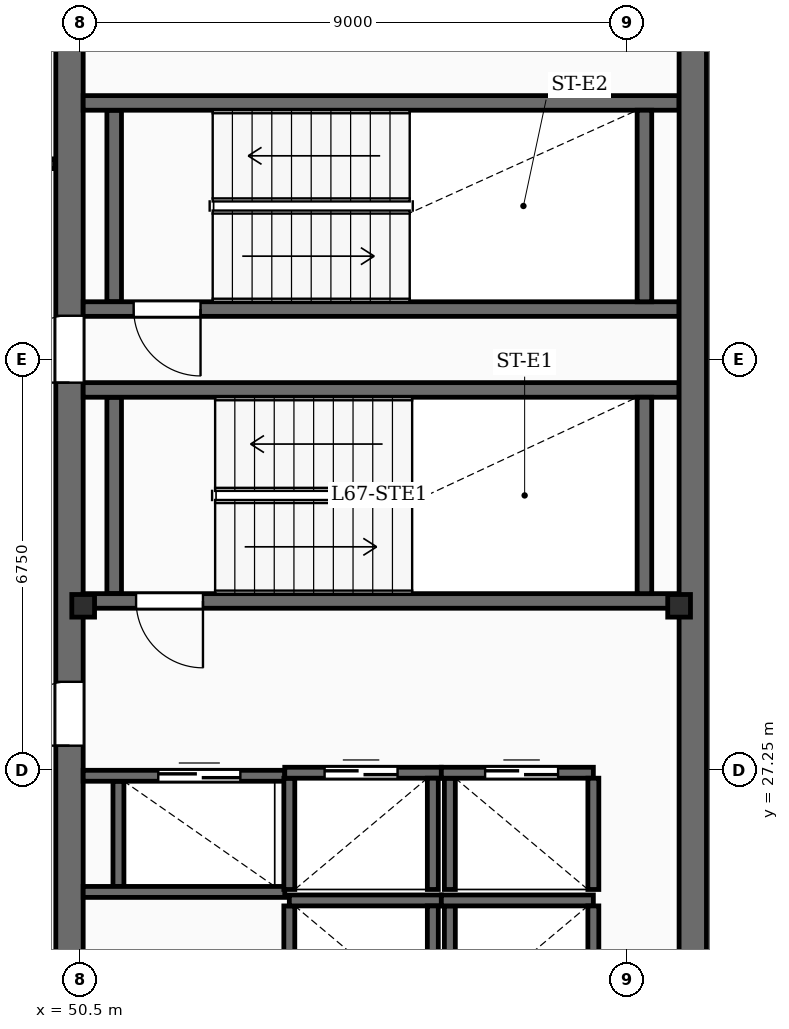
"""IFC4 building model, lengths in metres.
Left out: names, types, materials, properties, quantities, classifications, styles, units other than length and angle.
Written with IfcOpenShell. Run it as: python <this file> out.ifc"""

import sys

from ifc_helpers import new_model, si_unit, direction, frame, frame_2d, origin, origin_2d, place, context, subcontext, project, spatial, rectangle, i_section, extrude, element, fill, save


model = new_model("IFC4")
c1 = context("Model", 3, precision=1e-05, world=origin(), true_north=direction((0.0, 1.0)))
c2 = subcontext(c1, "Body", "Model", "MODEL_VIEW")
j1 = project(units=[si_unit("LENGTHUNIT", "METRE"), si_unit("PLANEANGLEUNIT", "RADIAN")], contexts=[c1])
p1 = place(None, origin())
s1 = spatial("IfcSite", under=j1, at=p1, CompositionType="ELEMENT")
p2 = place(p1, origin())
s2 = spatial("IfcBuilding", under=s1, at=p2, CompositionType="ELEMENT")
p3 = place(p2, frame((0.0, 0.0, 274.9)))
s3 = spatial("IfcBuildingStorey", under=s2, at=p3, CompositionType="ELEMENT", Elevation=274.9)
p4 = place(p3, frame((50.325, 19.0, -0.45), z_axis=(0.0, 0.0, 1.0), x_axis=(0.0, 1.0, 0.0)))
e1 = element("IfcWall", 1, at=p4, inside=s3, PredefinedType="SHEAR", context=c2, shape_type="SweptSolid", body=[
    extrude(rectangle(XDim=20.8, YDim=0.45, at=frame_2d((10.4, 0.0))), origin(), (0.0, 0.0, 1.0), 3.93),
])
p5 = place(p4, frame((2.5, 0.0, 0.45)))
e2 = element("IfcOpeningElement", 2, at=p5, cuts=e1, PredefinedType="OPENING", context=c2, shape_type="SweptSolid", body=[
    extrude(rectangle(XDim=1.05, YDim=2.15, at=frame_2d((0.525, 1.075))), frame((0.0, 0.235, 0.0), z_axis=(0.0, -1.0, 0.0), x_axis=(1.0, 0.0, 0.0)), (0.0, 0.0, 1.0), 0.47),
])
p6 = place(p4, frame((8.65, 0.0, 0.45)))
e3 = element("IfcOpeningElement", 3, at=p6, cuts=e1, PredefinedType="OPENING", context=c2, shape_type="SweptSolid", body=[
    extrude(rectangle(XDim=1.05, YDim=2.15, at=frame_2d((0.525, 1.075))), frame((0.0, 0.235, 0.0), z_axis=(0.0, -1.0, 0.0), x_axis=(1.0, 0.0, 0.0)), (0.0, 0.0, 1.0), 0.47),
])
p7 = place(p4, frame((14.62, 0.0, 0.45)))
e4 = element("IfcOpeningElement", 4, at=p7, cuts=e1, PredefinedType="OPENING", context=c2, shape_type="SweptSolid", body=[
    extrude(rectangle(XDim=1.1, YDim=2.15, at=frame_2d((0.55, 1.075))), frame((0.0, 0.235, 0.0), z_axis=(0.0, -1.0, 0.0), x_axis=(1.0, 0.0, 0.0)), (0.0, 0.0, 1.0), 0.47),
])
p8 = place(p3, frame((60.575, 19.0, -0.45), z_axis=(0.0, 0.0, 1.0), x_axis=(0.0, 1.0, 0.0)))
e5 = element("IfcWall", 5, at=p8, inside=s3, PredefinedType="SHEAR", context=c2, shape_type="SweptSolid", body=[
    extrude(rectangle(XDim=20.8, YDim=0.45, at=frame_2d((10.4, 0.0))), origin(), (0.0, 0.0, 1.0), 3.93),
])
for number, where, z_axis, x_axis in (
    (6, (50.55, 29.95, -0.45), (0.0, 0.0, 1.0), (1.0, 0.0, 0.0)),
    (7, (60.35, 29.95, -0.45), (0.0, 0.0, 1.0), (1.0, 0.0, 0.0)),
):
    element("IfcColumn", number, at=place(p3, frame(where, z_axis=z_axis, x_axis=x_axis)), inside=s3, PredefinedType="COLUMN", context=c2, shape_type="SweptSolid", body=[
        extrude(i_section(OverallWidth=0.374, OverallDepth=0.372, WebThickness=0.016, FlangeThickness=0.026, FilletRadius=0.02, at=origin_2d()), origin(), (0.0, 0.0, 1.0), 3.93),
    ])
p9 = place(p3, frame((60.35, 30.03, 0.0), z_axis=(0.0, 0.0, 1.0), x_axis=(-1.0, 0.0, 0.0)))
e8 = element("IfcWall", 8, at=p9, inside=s3, PredefinedType="SOLIDWALL", context=c2, shape_type="SweptSolid", body=[
    extrude(rectangle(XDim=9.8, YDim=0.24, at=frame_2d((4.9, 0.0))), origin(), (0.0, 0.0, 1.0), 3.48),
])
p10 = place(p9, frame((7.83, 0.0, 0.0)))
e9 = element("IfcOpeningElement", 9, at=p10, cuts=e8, PredefinedType="OPENING", context=c2, shape_type="SweptSolid", body=[
    extrude(rectangle(XDim=1.1, YDim=2.15, at=frame_2d((0.55, 1.075))), frame((0.0, 0.13, 0.0), z_axis=(0.0, -1.0, 0.0), x_axis=(1.0, 0.0, 0.0)), (0.0, 0.0, 1.0), 0.26),
])
p11 = place(p3, frame((50.55, 33.5, 0.0), z_axis=(0.0, 0.0, 1.0), x_axis=(1.0, 0.0, 0.0)))
e10 = element("IfcWall", 10, at=p11, inside=s3, PredefinedType="SOLIDWALL", context=c2, shape_type="SweptSolid", body=[
    extrude(rectangle(XDim=9.8, YDim=0.24, at=frame_2d((4.9, 0.0))), origin(), (0.0, 0.0, 1.0), 3.48),
])
for number, where, z_axis, x_axis in (
    (11, (51.06, 30.15, 0.0), (0.0, 0.0, 1.0), (0.0, 1.0, 0.0)),
    (12, (59.78, 30.15, 0.0), (0.0, 0.0, 1.0), (0.0, 1.0, 0.0)),
):
    element("IfcWall", number, at=place(p3, frame(where, z_axis=z_axis, x_axis=x_axis)), inside=s3, PredefinedType="SOLIDWALL", context=c2, shape_type="SweptSolid", body=[
        extrude(rectangle(XDim=3.23, YDim=0.24, at=frame_2d((1.615, 0.0))), origin(), (0.0, 0.0, 1.0), 3.48),
    ])
p12 = place(p3, frame((60.35, 34.83, 0.0), z_axis=(0.0, 0.0, 1.0), x_axis=(-1.0, 0.0, 0.0)))
e13 = element("IfcWall", 13, at=p12, inside=s3, PredefinedType="SOLIDWALL", context=c2, shape_type="SweptSolid", body=[
    extrude(rectangle(XDim=9.8, YDim=0.24, at=frame_2d((4.9, 0.0))), origin(), (0.0, 0.0, 1.0), 3.48),
])
p13 = place(p12, frame((7.87, 0.0, 0.0)))
e14 = element("IfcOpeningElement", 14, at=p13, cuts=e13, PredefinedType="OPENING", context=c2, shape_type="SweptSolid", body=[
    extrude(rectangle(XDim=1.1, YDim=2.15, at=frame_2d((0.55, 1.075))), frame((0.0, 0.13, 0.0), z_axis=(0.0, -1.0, 0.0), x_axis=(1.0, 0.0, 0.0)), (0.0, 0.0, 1.0), 0.26),
])
p14 = place(p3, frame((50.55, 38.22, 0.0), z_axis=(0.0, 0.0, 1.0), x_axis=(1.0, 0.0, 0.0)))
e15 = element("IfcWall", 15, at=p14, inside=s3, PredefinedType="SOLIDWALL", context=c2, shape_type="SweptSolid", body=[
    extrude(rectangle(XDim=9.8, YDim=0.24, at=frame_2d((4.9, 0.0))), origin(), (0.0, 0.0, 1.0), 3.48),
])
for number, where, z_axis, x_axis in (
    (16, (51.06, 34.95, 0.0), (0.0, 0.0, 1.0), (0.0, 1.0, 0.0)),
    (17, (59.78, 34.95, 0.0), (0.0, 0.0, 1.0), (0.0, 1.0, 0.0)),
):
    element("IfcWall", number, at=place(p3, frame(where, z_axis=z_axis, x_axis=x_axis)), inside=s3, PredefinedType="SOLIDWALL", context=c2, shape_type="SweptSolid", body=[
        extrude(rectangle(XDim=3.15, YDim=0.24, at=frame_2d((1.575, 0.0))), origin(), (0.0, 0.0, 1.0), 3.48),
    ])
p15 = place(p3, frame((53.94, 25.105, 0.0), z_axis=(0.0, 0.0, 1.0), x_axis=(1.0, 0.0, 0.0)))
e18 = element("IfcWall", 18, at=p15, inside=s3, PredefinedType="SOLIDWALL", context=c2, shape_type="SweptSolid", body=[
    extrude(rectangle(XDim=2.5, YDim=0.18, at=frame_2d((1.25, 0.0))), origin(), (0.0, 0.0, 1.0), 3.48),
])
for number, where, z_axis, x_axis in (
    (19, (53.94, 23.185, 0.0), (0.0, 0.0, 1.0), (0.0, 1.0, 0.0)),
    (20, (56.3, 23.185, 0.0), (0.0, 0.0, 1.0), (0.0, 1.0, 0.0)),
):
    element("IfcWall", number, at=place(p3, frame(where, z_axis=z_axis, x_axis=x_axis)), inside=s3, PredefinedType="SOLIDWALL", context=c2, shape_type="SweptSolid", body=[
        extrude(rectangle(XDim=1.83, YDim=0.18, at=frame_2d((0.915, 0.0))), origin(), (0.0, 0.0, 1.0), 3.48),
    ])
p16 = place(p3, frame((56.44, 25.105, 0.0), z_axis=(0.0, 0.0, 1.0), x_axis=(1.0, 0.0, 0.0)))
e21 = element("IfcWall", 21, at=p16, inside=s3, PredefinedType="SOLIDWALL", context=c2, shape_type="SweptSolid", body=[
    extrude(rectangle(XDim=2.5, YDim=0.18, at=frame_2d((1.25, 0.0))), origin(), (0.0, 0.0, 1.0), 3.48),
])
for number, where, z_axis, x_axis in (
    (22, (56.58, 23.185, 0.0), (0.0, 0.0, 1.0), (0.0, 1.0, 0.0)),
    (23, (58.94, 23.185, 0.0), (0.0, 0.0, 1.0), (0.0, 1.0, 0.0)),
):
    element("IfcWall", number, at=place(p3, frame(where, z_axis=z_axis, x_axis=x_axis)), inside=s3, PredefinedType="SOLIDWALL", context=c2, shape_type="SweptSolid", body=[
        extrude(rectangle(XDim=1.83, YDim=0.18, at=frame_2d((0.915, 0.0))), origin(), (0.0, 0.0, 1.0), 3.48),
    ])
p17 = place(p3, frame((53.865, 27.205, 0.0), z_axis=(0.0, 0.0, 1.0), x_axis=(1.0, 0.0, 0.0)))
e24 = element("IfcWall", 24, at=p17, inside=s3, PredefinedType="SOLIDWALL", context=c2, shape_type="SweptSolid", body=[
    extrude(rectangle(XDim=2.575, YDim=0.18, at=frame_2d((1.288, 0.0))), origin(), (0.0, 0.0, 1.0), 3.48),
])
p18 = place(p17, frame((0.655, 0.0, 0.0)))
e25 = element("IfcOpeningElement", 25, at=p18, cuts=e24, PredefinedType="OPENING", context=c2, shape_type="SweptSolid", body=[
    extrude(rectangle(XDim=1.2, YDim=2.2, at=frame_2d((0.6, 1.1))), frame((0.0, 0.1, 0.0), z_axis=(0.0, -1.0, 0.0), x_axis=(1.0, 0.0, 0.0)), (0.0, 0.0, 1.0), 0.2),
])
for number, where, z_axis, x_axis in (
    (26, (53.94, 25.285, 0.0), (0.0, 0.0, 1.0), (0.0, 1.0, 0.0)),
    (27, (56.3, 25.285, 0.0), (0.0, 0.0, 1.0), (0.0, 1.0, 0.0)),
):
    element("IfcWall", number, at=place(p3, frame(where, z_axis=z_axis, x_axis=x_axis)), inside=s3, PredefinedType="SOLIDWALL", context=c2, shape_type="SweptSolid", body=[
        extrude(rectangle(XDim=1.83, YDim=0.18, at=frame_2d((0.915, 0.0))), origin(), (0.0, 0.0, 1.0), 3.48),
    ])
p19 = place(p3, frame((56.44, 27.205, 0.0), z_axis=(0.0, 0.0, 1.0), x_axis=(1.0, 0.0, 0.0)))
e28 = element("IfcWall", 28, at=p19, inside=s3, PredefinedType="SOLIDWALL", context=c2, shape_type="SweptSolid", body=[
    extrude(rectangle(XDim=2.5, YDim=0.18, at=frame_2d((1.25, 0.0))), origin(), (0.0, 0.0, 1.0), 3.48),
])
p20 = place(p19, frame((0.72, 0.0, 0.0)))
e29 = element("IfcOpeningElement", 29, at=p20, cuts=e28, PredefinedType="OPENING", context=c2, shape_type="SweptSolid", body=[
    extrude(rectangle(XDim=1.2, YDim=2.2, at=frame_2d((0.6, 1.1))), frame((0.0, 0.1, 0.0), z_axis=(0.0, -1.0, 0.0), x_axis=(1.0, 0.0, 0.0)), (0.0, 0.0, 1.0), 0.2),
])
for number, where, z_axis, x_axis in (
    (30, (56.58, 25.285, 0.0), (0.0, 0.0, 1.0), (0.0, 1.0, 0.0)),
    (31, (58.94, 25.285, 0.0), (0.0, 0.0, 1.0), (0.0, 1.0, 0.0)),
):
    element("IfcWall", number, at=place(p3, frame(where, z_axis=z_axis, x_axis=x_axis)), inside=s3, PredefinedType="SOLIDWALL", context=c2, shape_type="SweptSolid", body=[
        extrude(rectangle(XDim=1.83, YDim=0.18, at=frame_2d((0.915, 0.0))), origin(), (0.0, 0.0, 1.0), 3.48),
    ])
p21 = place(p3, frame((50.55, 27.155, 0.0), z_axis=(0.0, 0.0, 1.0), x_axis=(1.0, 0.0, 0.0)))
e32 = element("IfcWall", 32, at=p21, inside=s3, PredefinedType="SOLIDWALL", context=c2, shape_type="SweptSolid", body=[
    extrude(rectangle(XDim=3.315, YDim=0.18, at=frame_2d((1.657, 0.0))), origin(), (0.0, 0.0, 1.0), 3.48),
])
p22 = place(p21, frame((1.235, 0.0, 0.0)))
e33 = element("IfcOpeningElement", 33, at=p22, cuts=e32, PredefinedType="OPENING", context=c2, shape_type="SweptSolid", body=[
    extrude(rectangle(XDim=1.35, YDim=2.3, at=frame_2d((0.675, 1.15))), frame((0.0, 0.1, 0.0), z_axis=(0.0, -1.0, 0.0), x_axis=(1.0, 0.0, 0.0)), (0.0, 0.0, 1.0), 0.2),
])
p23 = place(p3, frame((50.55, 25.245, 0.0), z_axis=(0.0, 0.0, 1.0), x_axis=(1.0, 0.0, 0.0)))
e34 = element("IfcWall", 34, at=p23, inside=s3, PredefinedType="SOLIDWALL", context=c2, shape_type="SweptSolid", body=[
    extrude(rectangle(XDim=3.315, YDim=0.18, at=frame_2d((1.657, 0.0))), origin(), (0.0, 0.0, 1.0), 3.48),
])
p24 = place(p3, frame((51.13, 25.335, 0.0), z_axis=(0.0, 0.0, 1.0), x_axis=(0.0, 1.0, 0.0)))
e35 = element("IfcWall", 35, at=p24, inside=s3, PredefinedType="SOLIDWALL", context=c2, shape_type="SweptSolid", body=[
    extrude(rectangle(XDim=1.73, YDim=0.18, at=frame_2d((0.865, 0.0))), origin(), (0.0, 0.0, 1.0), 3.48),
])
p25 = place(p3, frame((24.82, 37.22, 0.0), z_axis=(0.0, 0.0, 1.0), x_axis=(1.0, 0.0, 0.0)))
e36 = element("IfcWall", 36, at=p25, inside=s3, PredefinedType="PARTITIONING", context=c2, shape_type="SweptSolid", body=[
    extrude(rectangle(XDim=25.26, YDim=0.16, at=frame_2d((12.63, 0.0))), origin(), (0.0, 0.0, 1.0), 2.54),
])
p26 = place(p25, frame((4.03, 0.0, 0.0)))
e37 = element("IfcOpeningElement", 37, at=p26, cuts=e36, PredefinedType="OPENING", context=c2, shape_type="SweptSolid", body=[
    extrude(rectangle(XDim=0.95, YDim=2.15, at=frame_2d((0.475, 1.075))), frame((0.0, 0.09, 0.0), z_axis=(0.0, -1.0, 0.0), x_axis=(1.0, 0.0, 0.0)), (0.0, 0.0, 1.0), 0.18),
])
p27 = place(p25, frame((13.355, 0.0, 0.0)))
e38 = element("IfcOpeningElement", 38, at=p27, cuts=e36, PredefinedType="OPENING", context=c2, shape_type="SweptSolid", body=[
    extrude(rectangle(XDim=0.95, YDim=2.15, at=frame_2d((0.475, 1.075))), frame((0.0, 0.09, 0.0), z_axis=(0.0, -1.0, 0.0), x_axis=(1.0, 0.0, 0.0)), (0.0, 0.0, 1.0), 0.18),
])
p28 = place(p25, frame((21.48, 0.0, 0.0)))
e39 = element("IfcOpeningElement", 39, at=p28, cuts=e36, PredefinedType="OPENING", context=c2, shape_type="SweptSolid", body=[
    extrude(rectangle(XDim=0.95, YDim=2.15, at=frame_2d((0.475, 1.075))), frame((0.0, 0.09, 0.0), z_axis=(0.0, -1.0, 0.0), x_axis=(1.0, 0.0, 0.0)), (0.0, 0.0, 1.0), 0.18),
])
p29 = place(p6, origin())
e40 = element("IfcDoor", 40, at=p29, inside=s3, OperationType="SINGLE_SWING_LEFT", PredefinedType="DOOR", context=c2, shape_type="SweptSolid", body=[
    extrude(rectangle(XDim=1.05, YDim=2.15, at=frame_2d((0.525, 1.075))), frame((0.0, 0.025, 0.0), z_axis=(0.0, -1.0, 0.0), x_axis=(1.0, 0.0, 0.0)), (0.0, 0.0, 1.0), 0.05),
])
fill(e3, e40)
p30 = place(p7, origin())
e41 = element("IfcDoor", 41, at=p30, inside=s3, OperationType="SINGLE_SWING_LEFT", PredefinedType="DOOR", context=c2, shape_type="SweptSolid", body=[
    extrude(rectangle(XDim=1.1, YDim=2.15, at=frame_2d((0.55, 1.075))), frame((0.0, 0.025, 0.0), z_axis=(0.0, -1.0, 0.0), x_axis=(1.0, 0.0, 0.0)), (0.0, 0.0, 1.0), 0.05),
])
fill(e4, e41)
p31 = place(p10, origin())
e42 = element("IfcDoor", 42, at=p31, inside=s3, OperationType="SINGLE_SWING_LEFT", PredefinedType="DOOR", context=c2, shape_type="SweptSolid", body=[
    extrude(rectangle(XDim=1.1, YDim=2.15, at=frame_2d((0.55, 1.075))), frame((0.0, 0.025, 0.0), z_axis=(0.0, -1.0, 0.0), x_axis=(1.0, 0.0, 0.0)), (0.0, 0.0, 1.0), 0.05),
])
fill(e9, e42)
p32 = place(p13, origin())
e43 = element("IfcDoor", 43, at=p32, inside=s3, OperationType="SINGLE_SWING_LEFT", PredefinedType="DOOR", context=c2, shape_type="SweptSolid", body=[
    extrude(rectangle(XDim=1.1, YDim=2.15, at=frame_2d((0.55, 1.075))), frame((0.0, 0.025, 0.0), z_axis=(0.0, -1.0, 0.0), x_axis=(1.0, 0.0, 0.0)), (0.0, 0.0, 1.0), 0.05),
])
fill(e14, e43)
p33 = place(p18, origin())
e44 = element("IfcDoor", 44, at=p33, inside=s3, OperationType="DOUBLE_DOOR_SLIDING", PredefinedType="DOOR", context=c2, shape_type="SweptSolid", body=[
    extrude(rectangle(XDim=1.2, YDim=2.2, at=frame_2d((0.6, 1.1))), frame((0.0, 0.025, 0.0), z_axis=(0.0, -1.0, 0.0), x_axis=(1.0, 0.0, 0.0)), (0.0, 0.0, 1.0), 0.05),
])
fill(e25, e44)
p34 = place(p20, origin())
e45 = element("IfcDoor", 45, at=p34, inside=s3, OperationType="DOUBLE_DOOR_SLIDING", PredefinedType="DOOR", context=c2, shape_type="SweptSolid", body=[
    extrude(rectangle(XDim=1.2, YDim=2.2, at=frame_2d((0.6, 1.1))), frame((0.0, 0.025, 0.0), z_axis=(0.0, -1.0, 0.0), x_axis=(1.0, 0.0, 0.0)), (0.0, 0.0, 1.0), 0.05),
])
fill(e29, e45)
p35 = place(p22, origin())
e46 = element("IfcDoor", 46, at=p35, inside=s3, OperationType="DOUBLE_DOOR_SLIDING", PredefinedType="DOOR", context=c2, shape_type="SweptSolid", body=[
    extrude(rectangle(XDim=1.35, YDim=2.3, at=frame_2d((0.675, 1.15))), frame((0.0, 0.025, 0.0), z_axis=(0.0, -1.0, 0.0), x_axis=(1.0, 0.0, 0.0)), (0.0, 0.0, 1.0), 0.05),
])
fill(e33, e46)
save(model, sys.argv[1])
